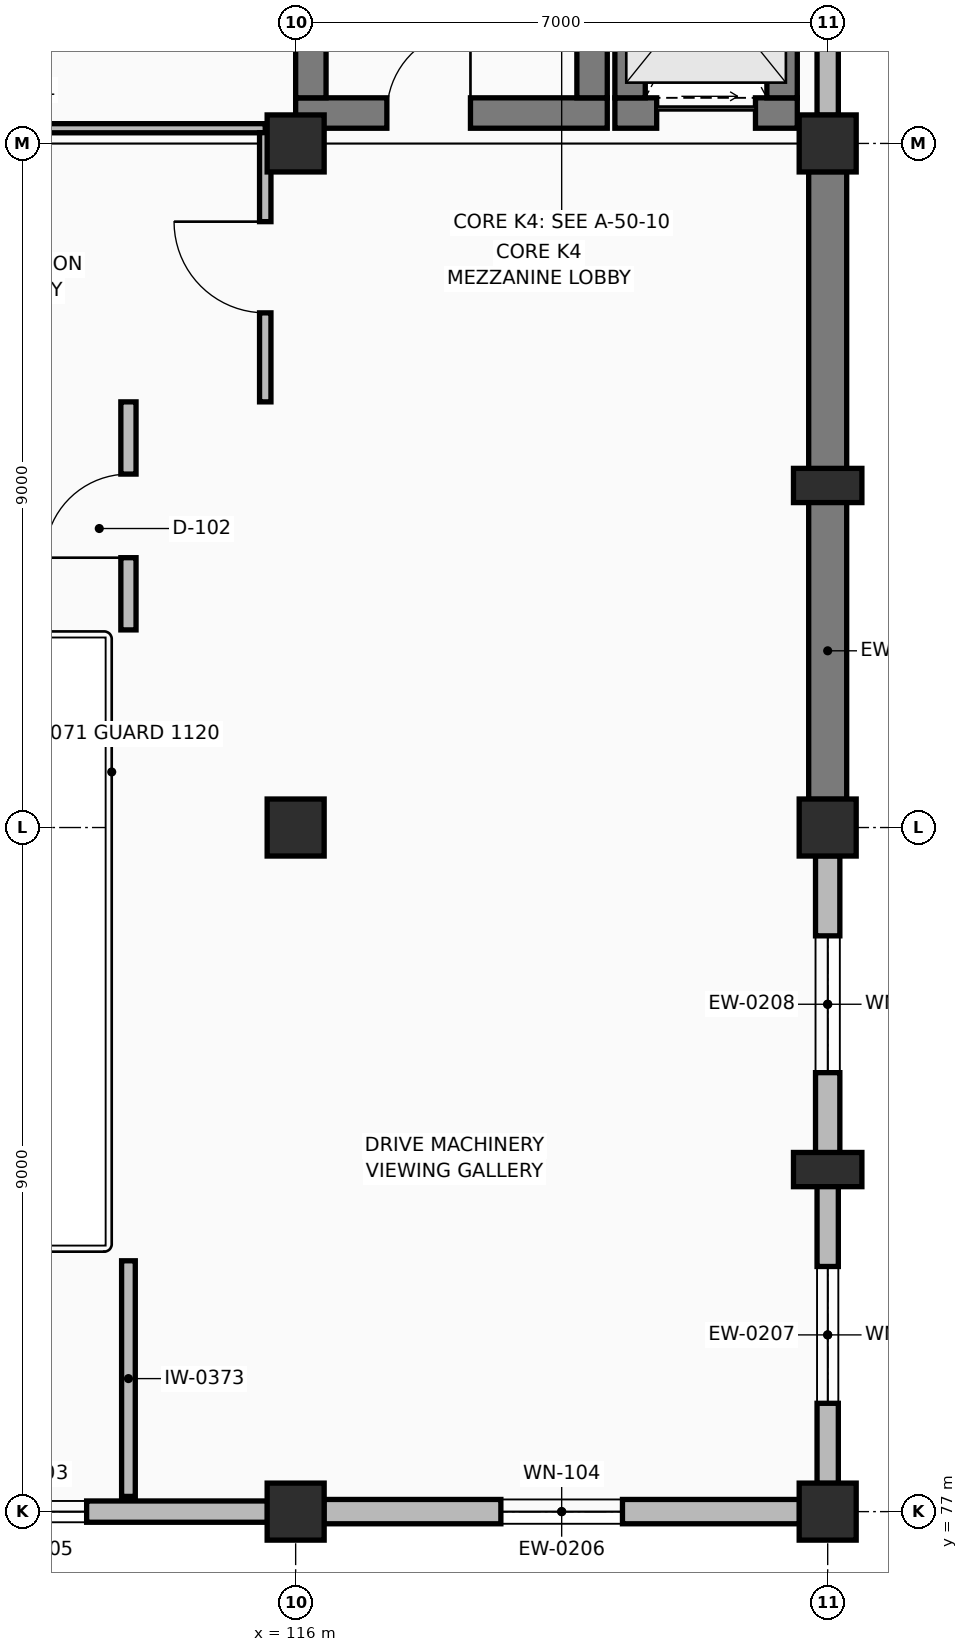
"""IFC4 building model, lengths in metres.
Left out: names, types, materials, properties, quantities, classifications, styles, units other than length and angle.
Written with IfcOpenShell. Run it as: python <this file> out.ifc"""

import sys

from ifc_helpers import new_model, si_unit, direction, frame, frame_2d, origin, origin_2d, place, context, subcontext, project, spatial, rectangle, extrude, element, fill, save


model = new_model("IFC4")
c1 = context("Model", 3, precision=1e-05, world=origin(), true_north=direction((0.0, 1.0)))
c2 = subcontext(c1, "Body", "Model", "MODEL_VIEW")
j1 = project(units=[si_unit("LENGTHUNIT", "METRE"), si_unit("PLANEANGLEUNIT", "RADIAN")], contexts=[c1])
p1 = place(None, origin())
s1 = spatial("IfcSite", under=j1, at=p1, CompositionType="ELEMENT")
p2 = place(p1, origin())
s2 = spatial("IfcBuilding", under=s1, at=p2, CompositionType="ELEMENT")
p3 = place(p2, frame((0.0, 0.0, 4.8)))
s3 = spatial("IfcBuildingStorey", under=s2, at=p3, CompositionType="ELEMENT", Elevation=4.8)
for number, where, z_axis, x_axis in (
    (1, (116.0, 77.0, 0.0), (0.0, 0.0, 1.0), (1.0, 0.0, 0.0)),
    (2, (116.0, 86.0, 0.0), (0.0, 0.0, 1.0), (1.0, 0.0, 0.0)),
    (3, (116.0, 95.0, 0.0), (0.0, 0.0, 1.0), (1.0, 0.0, 0.0)),
    (4, (123.0, 77.0, 0.0), (0.0, 0.0, 1.0), (1.0, 0.0, 0.0)),
    (5, (123.0, 86.0, 0.0), (0.0, 0.0, 1.0), (1.0, 0.0, 0.0)),
    (6, (123.0, 95.0, 0.0), (0.0, 0.0, 1.0), (1.0, 0.0, 0.0)),
):
    element("IfcColumn", number, at=place(p3, frame(where, z_axis=z_axis, x_axis=x_axis)), inside=s3, PredefinedType="COLUMN", context=c2, shape_type="SweptSolid", body=[
        extrude(rectangle(XDim=0.75, YDim=0.75, at=origin_2d()), origin(), (0.0, 0.0, 1.0), 4.8),
    ])
for number, where, z_axis, x_axis in (
    (7, (123.0, 81.5, 0.0), (0.0, 0.0, 1.0), (0.0, 1.0, 0.0)),
    (8, (123.0, 90.5, 0.0), (0.0, 0.0, 1.0), (0.0, 1.0, 0.0)),
):
    element("IfcColumn", number, at=place(p3, frame(where, z_axis=z_axis, x_axis=x_axis)), inside=s3, PredefinedType="PILASTER", context=c2, shape_type="SweptSolid", body=[
        extrude(rectangle(XDim=0.45, YDim=0.9, at=origin_2d()), origin(), (0.0, 0.0, 1.0), 4.8),
    ])
p4 = place(p3, frame((109.37, 77.0, 0.0), z_axis=(0.0, 0.0, 1.0), x_axis=(1.0, 0.0, 0.0)))
e9 = element("IfcWall", 9, at=p4, inside=s3, PredefinedType="SOLIDWALL", context=c2, shape_type="SweptSolid", body=[
    extrude(rectangle(XDim=6.26, YDim=0.28, at=frame_2d((3.13, 0.0))), origin(), (0.0, 0.0, 1.0), 3.245),
])
p5 = place(p4, frame((2.38, 0.0, 0.9)))
e10 = element("IfcOpeningElement", 10, at=p5, cuts=e9, PredefinedType="OPENING", context=c2, shape_type="SweptSolid", body=[
    extrude(rectangle(XDim=1.5, YDim=1.5, at=frame_2d((0.75, 0.75))), frame((0.0, 0.15, 0.0), z_axis=(0.0, -1.0, 0.0), x_axis=(1.0, 0.0, 0.0)), (0.0, 0.0, 1.0), 0.3),
])
p6 = place(p3, frame((116.37, 77.0, 0.0), z_axis=(0.0, 0.0, 1.0), x_axis=(1.0, 0.0, 0.0)))
e11 = element("IfcWall", 11, at=p6, inside=s3, PredefinedType="SOLIDWALL", context=c2, shape_type="SweptSolid", body=[
    extrude(rectangle(XDim=6.26, YDim=0.32, at=frame_2d((3.13, 0.0))), origin(), (0.0, 0.0, 1.0), 3.245),
])
p7 = place(p6, frame((2.33, 0.0, 0.9)))
e12 = element("IfcOpeningElement", 12, at=p7, cuts=e11, PredefinedType="OPENING", context=c2, shape_type="SweptSolid", body=[
    extrude(rectangle(XDim=1.6, YDim=1.55, at=frame_2d((0.8, 0.775))), frame((0.0, 0.17, 0.0), z_axis=(0.0, -1.0, 0.0), x_axis=(1.0, 0.0, 0.0)), (0.0, 0.0, 1.0), 0.34),
])
p8 = place(p3, frame((123.0, 77.37, 0.0), z_axis=(0.0, 0.0, 1.0), x_axis=(0.0, 1.0, 0.0)))
e13 = element("IfcWall", 13, at=p8, inside=s3, PredefinedType="SOLIDWALL", context=c2, shape_type="SweptSolid", body=[
    extrude(rectangle(XDim=3.91, YDim=0.28, at=frame_2d((1.955, 0.0))), origin(), (0.0, 0.0, 1.0), 3.245),
])
p9 = place(p8, frame((1.055, 0.0, 0.9)))
e14 = element("IfcOpeningElement", 14, at=p9, cuts=e13, PredefinedType="OPENING", context=c2, shape_type="SweptSolid", body=[
    extrude(rectangle(XDim=1.8, YDim=1.5, at=frame_2d((0.9, 0.75))), frame((0.0, 0.15, 0.0), z_axis=(0.0, -1.0, 0.0), x_axis=(1.0, 0.0, 0.0)), (0.0, 0.0, 1.0), 0.3),
])
p10 = place(p3, frame((123.0, 81.72, 0.0), z_axis=(0.0, 0.0, 1.0), x_axis=(0.0, 1.0, 0.0)))
e15 = element("IfcWall", 15, at=p10, inside=s3, PredefinedType="SOLIDWALL", context=c2, shape_type="SweptSolid", body=[
    extrude(rectangle(XDim=3.91, YDim=0.32, at=frame_2d((1.955, 0.0))), origin(), (0.0, 0.0, 1.0), 3.245),
])
p11 = place(p10, frame((1.055, 0.0, 0.9)))
e16 = element("IfcOpeningElement", 16, at=p11, cuts=e15, PredefinedType="OPENING", context=c2, shape_type="SweptSolid", body=[
    extrude(rectangle(XDim=1.8, YDim=1.6, at=frame_2d((0.9, 0.8))), frame((0.0, 0.17, 0.0), z_axis=(0.0, -1.0, 0.0), x_axis=(1.0, 0.0, 0.0)), (0.0, 0.0, 1.0), 0.34),
])
for number, where, z_axis, x_axis in (
    (17, (123.0, 86.37, 0.0), (0.0, 0.0, 1.0), (0.0, 1.0, 0.0)),
    (18, (123.0, 90.72, 0.0), (0.0, 0.0, 1.0), (0.0, 1.0, 0.0)),
):
    element("IfcWall", number, at=place(p3, frame(where, z_axis=z_axis, x_axis=x_axis)), inside=s3, PredefinedType="SHEAR", context=c2, shape_type="SweptSolid", body=[
        extrude(rectangle(XDim=3.91, YDim=0.5, at=frame_2d((1.955, 0.0))), origin(), (0.0, 0.0, 1.0), 3.245),
    ])
p12 = place(p3, frame((123.0, 95.37, 0.0), z_axis=(0.0, 0.0, 1.0), x_axis=(0.0, 1.0, 0.0)))
e19 = element("IfcWall", 19, at=p12, inside=s3, PredefinedType="SOLIDWALL", context=c2, shape_type="SweptSolid", body=[
    extrude(rectangle(XDim=3.91, YDim=0.28, at=frame_2d((1.955, 0.0))), origin(), (0.0, 0.0, 1.0), 3.495),
])
p13 = place(p12, frame((0.955, 0.0, 0.9)))
e20 = element("IfcOpeningElement", 20, at=p13, cuts=e19, PredefinedType="OPENING", context=c2, shape_type="SweptSolid", body=[
    extrude(rectangle(XDim=2.0, YDim=1.5, at=frame_2d((1.0, 0.75))), frame((0.0, 0.15, 0.0), z_axis=(0.0, -1.0, 0.0), x_axis=(1.0, 0.0, 0.0)), (0.0, 0.0, 1.0), 0.3),
])
p14 = place(p3, frame((116.0, 95.4, 0.0), z_axis=(0.0, 0.0, 1.0), x_axis=(1.0, 0.0, 0.0)))
e21 = element("IfcWall", 21, at=p14, inside=s3, PredefinedType="SHEAR", context=c2, shape_type="SweptSolid", body=[
    extrude(rectangle(XDim=4.1, YDim=0.4, at=frame_2d((2.05, 0.0))), origin(), (0.0, 0.0, 1.0), 4.49),
])
p15 = place(p14, frame((1.2, 0.0, 0.0)))
e22 = element("IfcOpeningElement", 22, at=p15, cuts=e21, PredefinedType="OPENING", context=c2, shape_type="SweptSolid", body=[
    extrude(rectangle(XDim=1.1, YDim=2.2, at=frame_2d((0.55, 1.1))), frame((0.0, 0.21, 0.0), z_axis=(0.0, -1.0, 0.0), x_axis=(1.0, 0.0, 0.0)), (0.0, 0.0, 1.0), 0.42),
])
for number, where, z_axis, x_axis in (
    (23, (119.9, 95.6, 0.0), (0.0, 0.0, 1.0), (0.0, 1.0, 0.0)),
    (24, (116.2, 103.0, 0.0), (0.0, 0.0, 1.0), (0.0, -1.0, 0.0)),
):
    element("IfcWall", number, at=place(p3, frame(where, z_axis=z_axis, x_axis=x_axis)), inside=s3, PredefinedType="SHEAR", context=c2, shape_type="SweptSolid", body=[
        extrude(rectangle(XDim=7.4, YDim=0.4, at=frame_2d((3.7, 0.0))), origin(), (0.0, 0.0, 1.0), 4.49),
    ])
p16 = place(p3, frame((120.2, 95.4, 0.0), z_axis=(0.0, 0.0, 1.0), x_axis=(1.0, 0.0, 0.0)))
e25 = element("IfcWall", 25, at=p16, inside=s3, PredefinedType="SHEAR", context=c2, shape_type="SweptSolid", body=[
    extrude(rectangle(XDim=2.4, YDim=0.4, at=frame_2d((1.2, 0.0))), origin(), (0.0, 0.0, 1.0), 4.49),
])
p17 = place(p16, frame((0.55, 0.0, 0.0)))
e26 = element("IfcOpeningElement", 26, at=p17, cuts=e25, PredefinedType="OPENING", context=c2, shape_type="SweptSolid", body=[
    extrude(rectangle(XDim=1.3, YDim=2.25, at=frame_2d((0.65, 1.125))), frame((0.0, 0.21, 0.0), z_axis=(0.0, -1.0, 0.0), x_axis=(1.0, 0.0, 0.0)), (0.0, 0.0, 1.0), 0.42),
])
for number, where, z_axis, x_axis in (
    (27, (122.4, 95.6, 0.0), (0.0, 0.0, 1.0), (0.0, 1.0, 0.0)),
    (28, (120.4, 98.6, 0.0), (0.0, 0.0, 1.0), (0.0, -1.0, 0.0)),
):
    element("IfcWall", number, at=place(p3, frame(where, z_axis=z_axis, x_axis=x_axis)), inside=s3, PredefinedType="SHEAR", context=c2, shape_type="SweptSolid", body=[
        extrude(rectangle(XDim=3.0, YDim=0.4, at=frame_2d((1.5, 0.0))), origin(), (0.0, 0.0, 1.0), 4.49),
    ])
p18 = place(p3, frame((95.2, 95.2, 0.0), z_axis=(0.0, 0.0, 1.0), x_axis=(1.0, 0.0, 0.0)))
e29 = element("IfcWall", 29, at=p18, inside=s3, PredefinedType="PARTITIONING", context=c2, shape_type="SweptSolid", body=[
    extrude(rectangle(XDim=20.4, YDim=0.12, at=frame_2d((10.2, 0.0))), origin(), (0.0, 0.0, 1.0), 3.235),
])
p19 = place(p18, frame((9.65, 0.0, 0.0)))
e30 = element("IfcOpeningElement", 30, at=p19, cuts=e29, PredefinedType="OPENING", context=c2, shape_type="SweptSolid", body=[
    extrude(rectangle(XDim=1.1, YDim=2.2, at=frame_2d((0.55, 1.1))), frame((0.0, 0.07, 0.0), z_axis=(0.0, -1.0, 0.0), x_axis=(1.0, 0.0, 0.0)), (0.0, 0.0, 1.0), 0.14),
])
p20 = place(p3, frame((115.6, 91.6, 0.0), z_axis=(0.0, 0.0, 1.0), x_axis=(0.0, 1.0, 0.0)))
e31 = element("IfcWall", 31, at=p20, inside=s3, PredefinedType="PARTITIONING", context=c2, shape_type="SweptSolid", body=[
    extrude(rectangle(XDim=3.542, YDim=0.15, at=frame_2d((1.771, 0.0))), origin(), (0.0, 0.0, 1.0), 3.235),
])
p21 = place(p20, frame((1.171, 0.0, 0.0)))
e32 = element("IfcOpeningElement", 32, at=p21, cuts=e31, PredefinedType="OPENING", context=c2, shape_type="SweptSolid", body=[
    extrude(rectangle(XDim=1.2, YDim=2.2, at=frame_2d((0.6, 1.1))), frame((0.0, 0.085, 0.0), z_axis=(0.0, -1.0, 0.0), x_axis=(1.0, 0.0, 0.0)), (0.0, 0.0, 1.0), 0.17),
])
p22 = place(p3, frame((113.8, 77.2, 0.0), z_axis=(0.0, 0.0, 1.0), x_axis=(0.0, 1.0, 0.0)))
e33 = element("IfcWall", 33, at=p22, inside=s3, PredefinedType="STANDARD", context=c2, shape_type="SweptSolid", body=[
    extrude(rectangle(XDim=3.1, YDim=0.18, at=frame_2d((1.55, 0.0))), origin(), (0.0, 0.0, 1.0), 3.235),
])
p23 = place(p3, frame((113.8, 88.6, 0.0), z_axis=(0.0, 0.0, 1.0), x_axis=(0.0, 1.0, 0.0)))
e34 = element("IfcWall", 34, at=p23, inside=s3, PredefinedType="PARTITIONING", context=c2, shape_type="SweptSolid", body=[
    extrude(rectangle(XDim=3.0, YDim=0.2, at=frame_2d((1.5, 0.0))), origin(), (0.0, 0.0, 1.0), 4.435),
])
p24 = place(p23, frame((0.95, 0.0, 0.0)))
e35 = element("IfcOpeningElement", 35, at=p24, cuts=e34, PredefinedType="OPENING", context=c2, shape_type="SweptSolid", body=[
    extrude(rectangle(XDim=1.1, YDim=2.2, at=frame_2d((0.55, 1.1))), frame((0.0, 0.11, 0.0), z_axis=(0.0, -1.0, 0.0), x_axis=(1.0, 0.0, 0.0)), (0.0, 0.0, 1.0), 0.22),
])
p25 = place(p5, origin())
e36 = element("IfcWindow", 36, at=p25, inside=s3, PartitioningType="SINGLE_PANEL", PredefinedType="WINDOW", context=c2, shape_type="SweptSolid", body=[
    extrude(rectangle(XDim=1.5, YDim=1.5, at=frame_2d((0.75, 0.75))), frame((0.0, 0.03, 0.0), z_axis=(0.0, -1.0, 0.0), x_axis=(1.0, 0.0, 0.0)), (0.0, 0.0, 1.0), 0.06),
])
fill(e10, e36)
p26 = place(p7, origin())
e37 = element("IfcWindow", 37, at=p26, inside=s3, PartitioningType="SINGLE_PANEL", PredefinedType="WINDOW", context=c2, shape_type="SweptSolid", body=[
    extrude(rectangle(XDim=1.6, YDim=1.55, at=frame_2d((0.8, 0.775))), frame((0.0, 0.03, 0.0), z_axis=(0.0, -1.0, 0.0), x_axis=(1.0, 0.0, 0.0)), (0.0, 0.0, 1.0), 0.06),
])
fill(e12, e37)
p27 = place(p9, origin())
e38 = element("IfcWindow", 38, at=p27, inside=s3, PartitioningType="SINGLE_PANEL", PredefinedType="WINDOW", context=c2, shape_type="SweptSolid", body=[
    extrude(rectangle(XDim=1.8, YDim=1.5, at=frame_2d((0.9, 0.75))), frame((0.0, 0.03, 0.0), z_axis=(0.0, -1.0, 0.0), x_axis=(1.0, 0.0, 0.0)), (0.0, 0.0, 1.0), 0.06),
])
fill(e14, e38)
p28 = place(p11, origin())
e39 = element("IfcWindow", 39, at=p28, inside=s3, PartitioningType="SINGLE_PANEL", PredefinedType="WINDOW", context=c2, shape_type="SweptSolid", body=[
    extrude(rectangle(XDim=1.8, YDim=1.6, at=frame_2d((0.9, 0.8))), frame((0.0, 0.03, 0.0), z_axis=(0.0, -1.0, 0.0), x_axis=(1.0, 0.0, 0.0)), (0.0, 0.0, 1.0), 0.06),
])
fill(e16, e39)
p29 = place(p15, origin())
e40 = element("IfcDoor", 40, at=p29, inside=s3, OperationType="SINGLE_SWING_RIGHT", PredefinedType="DOOR", context=c2, shape_type="SweptSolid", body=[
    extrude(rectangle(XDim=1.1, YDim=2.2, at=frame_2d((0.55, 1.1))), frame((0.0, 0.025, 0.0), z_axis=(0.0, -1.0, 0.0), x_axis=(1.0, 0.0, 0.0)), (0.0, 0.0, 1.0), 0.05),
])
fill(e22, e40)
p30 = place(p17, origin())
e41 = element("IfcDoor", 41, at=p30, inside=s3, OperationType="SLIDING_TO_RIGHT", PredefinedType="DOOR", context=c2, shape_type="SweptSolid", body=[
    extrude(rectangle(XDim=1.3, YDim=2.25, at=frame_2d((0.65, 1.125))), frame((0.0, 0.025, 0.0), z_axis=(0.0, -1.0, 0.0), x_axis=(1.0, 0.0, 0.0)), (0.0, 0.0, 1.0), 0.05),
])
fill(e26, e41)
p31 = place(p21, origin())
e42 = element("IfcDoor", 42, at=p31, inside=s3, OperationType="SINGLE_SWING_RIGHT", PredefinedType="DOOR", context=c2, shape_type="SweptSolid", body=[
    extrude(rectangle(XDim=1.2, YDim=2.2, at=frame_2d((0.6, 1.1))), frame((0.0, 0.025, 0.0), z_axis=(0.0, -1.0, 0.0), x_axis=(1.0, 0.0, 0.0)), (0.0, 0.0, 1.0), 0.05),
])
fill(e32, e42)
p32 = place(p24, origin())
e43 = element("IfcDoor", 43, at=p32, inside=s3, OperationType="SINGLE_SWING_LEFT", PredefinedType="DOOR", context=c2, shape_type="SweptSolid", body=[
    extrude(rectangle(XDim=1.1, YDim=2.2, at=frame_2d((0.55, 1.1))), frame((0.0, 0.025, 0.0), z_axis=(0.0, -1.0, 0.0), x_axis=(1.0, 0.0, 0.0)), (0.0, 0.0, 1.0), 0.05),
])
fill(e35, e43)
save(model, sys.argv[1])
